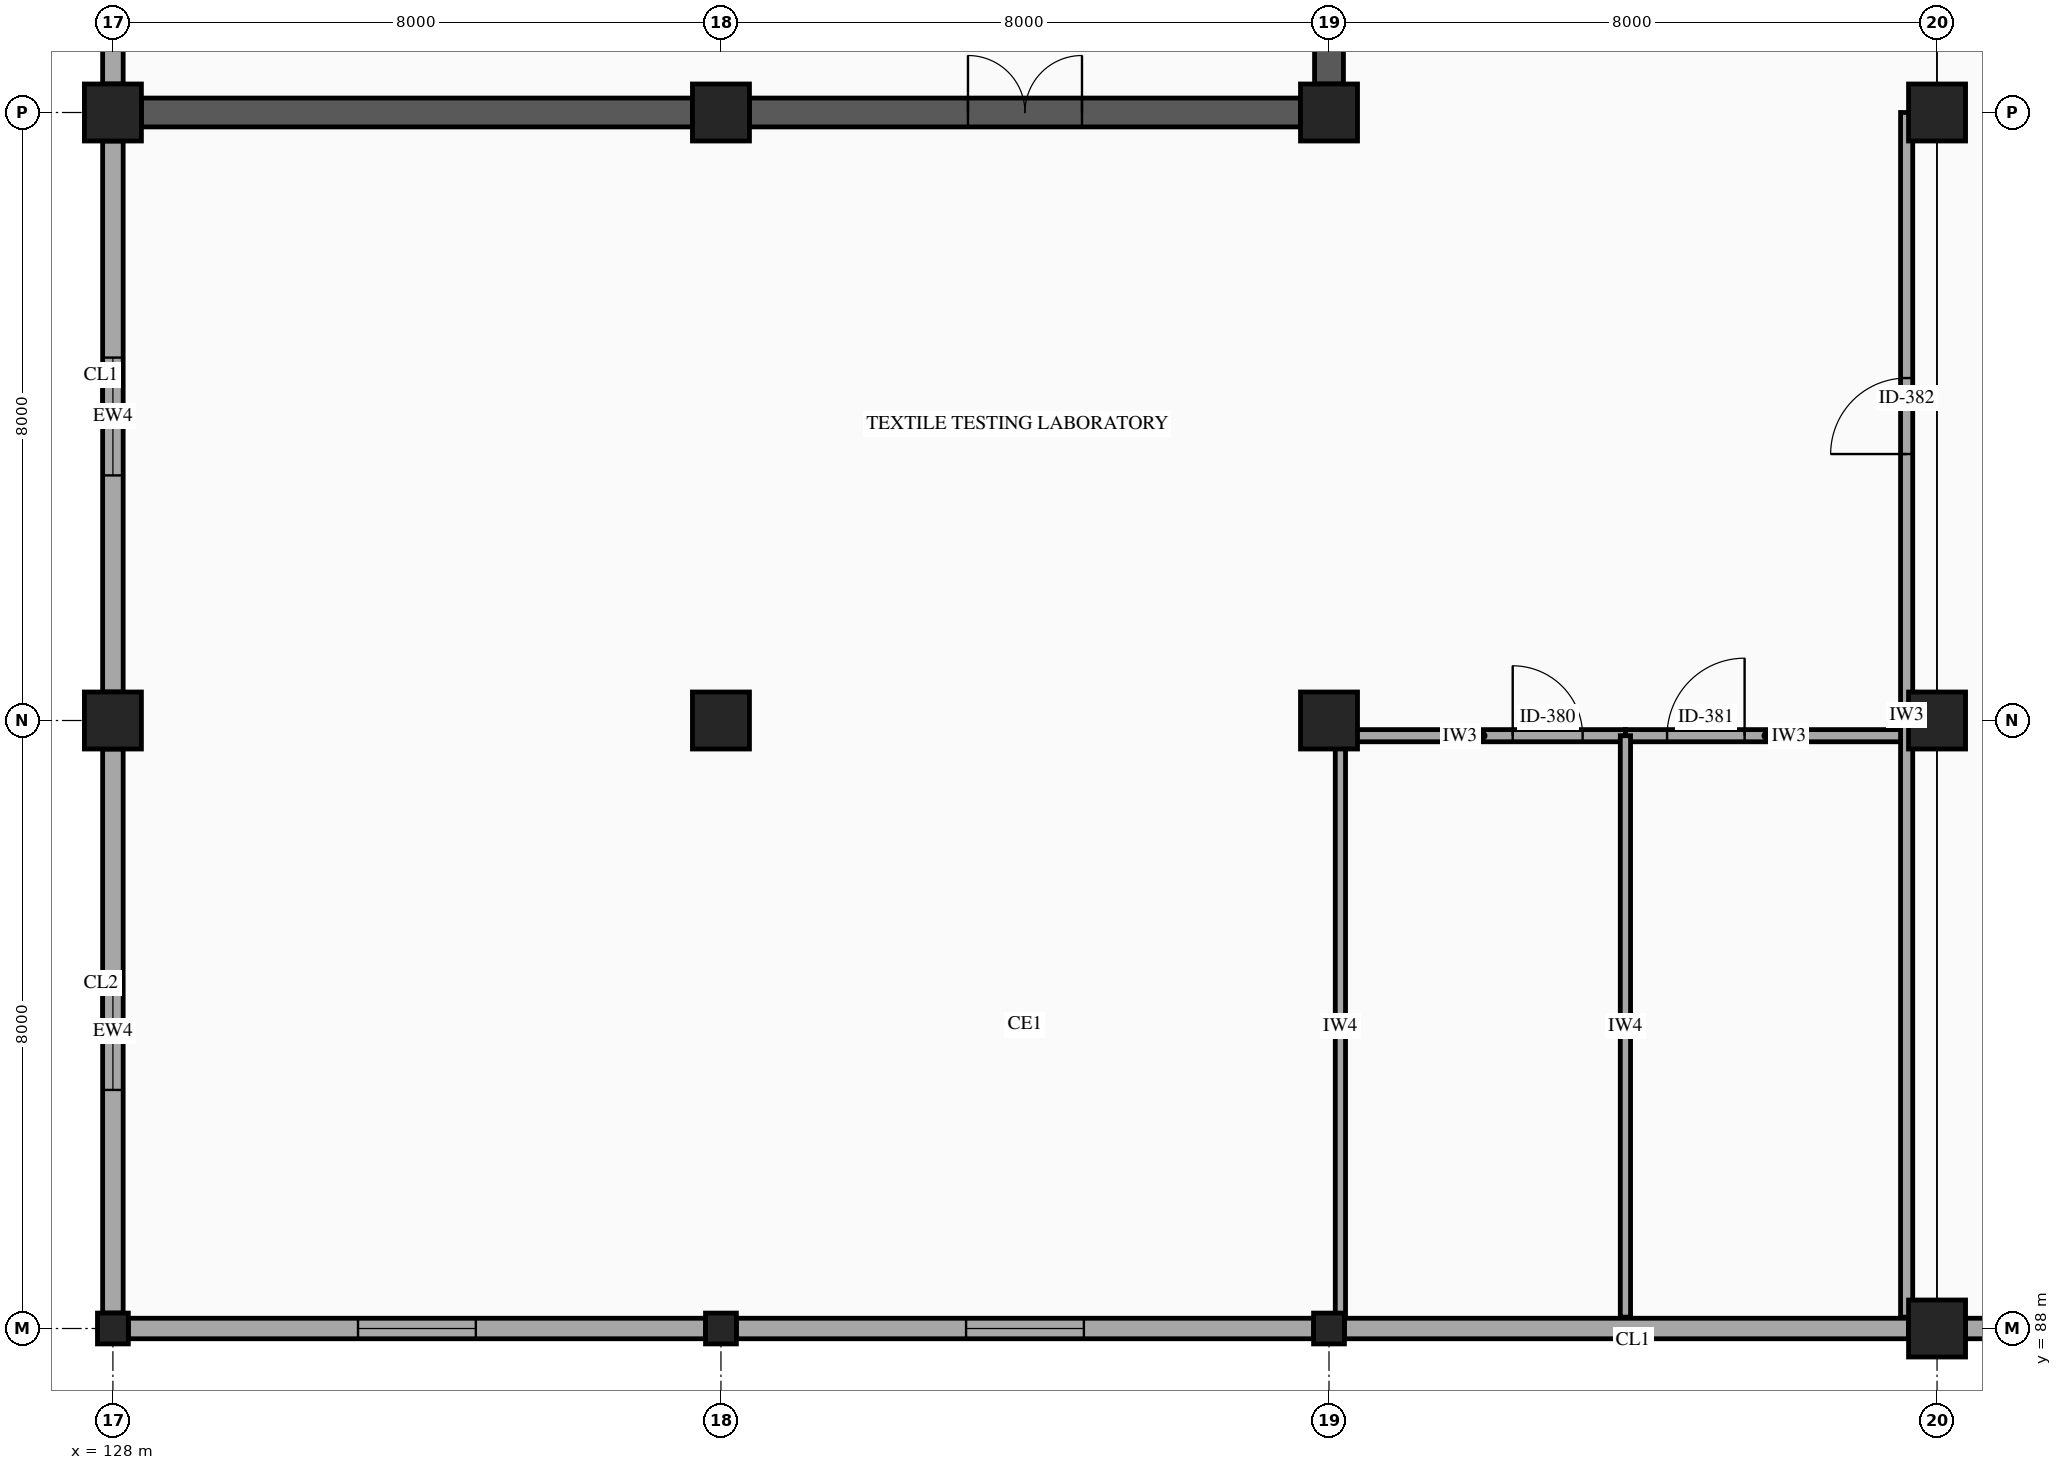
"""IFC4 building model, lengths in metres.
Left out: names, types, materials, properties, quantities, classifications, styles, units other than length and angle.
Written with IfcOpenShell. Run it as: python <this file> out.ifc"""

import sys

from ifc_helpers import new_model, si_unit, direction, frame, frame_2d, origin, origin_2d, place, context, subcontext, project, spatial, rectangle, hollow_circle, extrude, element, fill, save


model = new_model("IFC4")
c1 = context("Model", 3, precision=1e-05, world=origin(), true_north=direction((0.0, 1.0)))
c2 = subcontext(c1, "Body", "Model", "MODEL_VIEW")
j1 = project(units=[si_unit("LENGTHUNIT", "METRE"), si_unit("PLANEANGLEUNIT", "RADIAN")], contexts=[c1])
p1 = place(None, origin())
s1 = spatial("IfcSite", under=j1, at=p1, CompositionType="ELEMENT")
p2 = place(p1, origin())
s2 = spatial("IfcBuilding", under=s1, at=p2, CompositionType="ELEMENT")
p3 = place(p2, frame((0.0, 0.0, 32.9)))
s3 = spatial("IfcBuildingStorey", under=s2, at=p3, CompositionType="ELEMENT", Elevation=32.9)
p4 = place(p3, frame((128.0, 88.0, 0.0), z_axis=(0.0, 0.0, 1.0), x_axis=(1.0, 0.0, 0.0)))
e1 = element("IfcColumn", 1, at=p4, inside=s3, PredefinedType="COLUMN", context=c2, shape_type="SweptSolid", body=[
    extrude(hollow_circle(Radius=0.203, WallThickness=0.012, at=origin_2d()), origin(), (0.0, 0.0, 1.0), 4.6),
])
for number, where, z_axis, x_axis in (
    (2, (128.0, 96.0, 0.0), (0.0, 0.0, 1.0), (1.0, 0.0, 0.0)),
    (3, (128.0, 104.0, 0.0), (0.0, 0.0, 1.0), (1.0, 0.0, 0.0)),
):
    element("IfcColumn", number, at=place(p3, frame(where, z_axis=z_axis, x_axis=x_axis)), inside=s3, PredefinedType="COLUMN", context=c2, shape_type="SweptSolid", body=[
        extrude(rectangle(XDim=0.75, YDim=0.75, at=origin_2d()), origin(), (0.0, 0.0, 1.0), 4.6),
    ])
p5 = place(p3, frame((136.0, 88.0, 0.0), z_axis=(0.0, 0.0, 1.0), x_axis=(1.0, 0.0, 0.0)))
e4 = element("IfcColumn", 4, at=p5, inside=s3, PredefinedType="COLUMN", context=c2, shape_type="SweptSolid", body=[
    extrude(hollow_circle(Radius=0.203, WallThickness=0.012, at=origin_2d()), origin(), (0.0, 0.0, 1.0), 4.6),
])
for number, where, z_axis, x_axis in (
    (5, (136.0, 96.0, 0.0), (0.0, 0.0, 1.0), (1.0, 0.0, 0.0)),
    (6, (136.0, 104.0, 0.0), (0.0, 0.0, 1.0), (1.0, 0.0, 0.0)),
):
    element("IfcColumn", number, at=place(p3, frame(where, z_axis=z_axis, x_axis=x_axis)), inside=s3, PredefinedType="COLUMN", context=c2, shape_type="SweptSolid", body=[
        extrude(rectangle(XDim=0.75, YDim=0.75, at=origin_2d()), origin(), (0.0, 0.0, 1.0), 4.6),
    ])
p6 = place(p3, frame((144.0, 88.0, 0.0), z_axis=(0.0, 0.0, 1.0), x_axis=(1.0, 0.0, 0.0)))
e7 = element("IfcColumn", 7, at=p6, inside=s3, PredefinedType="COLUMN", context=c2, shape_type="SweptSolid", body=[
    extrude(hollow_circle(Radius=0.203, WallThickness=0.012, at=origin_2d()), origin(), (0.0, 0.0, 1.0), 4.6),
])
for number, where, z_axis, x_axis in (
    (8, (144.0, 96.0, 0.0), (0.0, 0.0, 1.0), (1.0, 0.0, 0.0)),
    (9, (144.0, 104.0, 0.0), (0.0, 0.0, 1.0), (1.0, 0.0, 0.0)),
    (10, (152.0, 88.0, 0.0), (0.0, 0.0, 1.0), (1.0, 0.0, 0.0)),
    (11, (152.0, 96.0, 0.0), (0.0, 0.0, 1.0), (1.0, 0.0, 0.0)),
    (12, (152.0, 104.0, 0.0), (0.0, 0.0, 1.0), (1.0, 0.0, 0.0)),
):
    element("IfcColumn", number, at=place(p3, frame(where, z_axis=z_axis, x_axis=x_axis)), inside=s3, PredefinedType="COLUMN", context=c2, shape_type="SweptSolid", body=[
        extrude(rectangle(XDim=0.75, YDim=0.75, at=origin_2d()), origin(), (0.0, 0.0, 1.0), 4.6),
    ])
p7 = place(p3, frame((128.0, 88.203, 0.0), z_axis=(0.0, 0.0, 1.0), x_axis=(0.0, 1.0, 0.0)))
e13 = element("IfcWall", 13, at=p7, inside=s3, PredefinedType="STANDARD", context=c2, shape_type="SweptSolid", body=[
    extrude(rectangle(XDim=7.422, YDim=0.27, at=frame_2d((3.711, 0.0))), origin(), (0.0, 0.0, 1.0), 3.58),
])
p8 = place(p7, frame((2.936, 0.0, 0.8)))
e14 = element("IfcOpeningElement", 14, at=p8, cuts=e13, PredefinedType="OPENING", context=c2, shape_type="SweptSolid", body=[
    extrude(rectangle(XDim=1.55, YDim=1.4, at=frame_2d((0.775, 0.7))), frame((0.0, 0.145, 0.0), z_axis=(0.0, -1.0, 0.0), x_axis=(1.0, 0.0, 0.0)), (0.0, 0.0, 1.0), 0.29),
])
p9 = place(p3, frame((128.0, 96.375, 0.0), z_axis=(0.0, 0.0, 1.0), x_axis=(0.0, 1.0, 0.0)))
e15 = element("IfcWall", 15, at=p9, inside=s3, PredefinedType="STANDARD", context=c2, shape_type="SweptSolid", body=[
    extrude(rectangle(XDim=7.25, YDim=0.27, at=frame_2d((3.625, 0.0))), origin(), (0.0, 0.0, 1.0), 3.58),
])
p10 = place(p9, frame((2.85, 0.0, 0.8)))
e16 = element("IfcOpeningElement", 16, at=p10, cuts=e15, PredefinedType="OPENING", context=c2, shape_type="SweptSolid", body=[
    extrude(rectangle(XDim=1.55, YDim=1.4, at=frame_2d((0.775, 0.7))), frame((0.0, 0.145, 0.0), z_axis=(0.0, -1.0, 0.0), x_axis=(1.0, 0.0, 0.0)), (0.0, 0.0, 1.0), 0.29),
])
p11 = place(p3, frame((128.0, 104.375, 0.0), z_axis=(0.0, 0.0, 1.0), x_axis=(0.0, 1.0, 0.0)))
e17 = element("IfcWall", 17, at=p11, inside=s3, PredefinedType="STANDARD", context=c2, shape_type="SweptSolid", body=[
    extrude(rectangle(XDim=7.25, YDim=0.27, at=frame_2d((3.625, 0.0))), origin(), (0.0, 0.0, 1.0), 3.58),
])
p12 = place(p3, frame((159.625, 88.0, 0.0), z_axis=(0.0, 0.0, 1.0), x_axis=(-1.0, 0.0, 0.0)))
e18 = element("IfcWall", 18, at=p12, inside=s3, PredefinedType="STANDARD", context=c2, shape_type="SweptSolid", body=[
    extrude(rectangle(XDim=7.25, YDim=0.27, at=frame_2d((3.625, 0.0))), origin(), (0.0, 0.0, 1.0), 3.58),
])
p13 = place(p12, frame((2.85, 0.0, 0.8)))
e19 = element("IfcOpeningElement", 19, at=p13, cuts=e18, PredefinedType="OPENING", context=c2, shape_type="SweptSolid", body=[
    extrude(rectangle(XDim=1.55, YDim=1.4, at=frame_2d((0.775, 0.7))), frame((0.0, 0.145, 0.0), z_axis=(0.0, -1.0, 0.0), x_axis=(1.0, 0.0, 0.0)), (0.0, 0.0, 1.0), 0.29),
])
p14 = place(p3, frame((151.625, 88.0, 0.0), z_axis=(0.0, 0.0, 1.0), x_axis=(-1.0, 0.0, 0.0)))
e20 = element("IfcWall", 20, at=p14, inside=s3, PredefinedType="STANDARD", context=c2, shape_type="SweptSolid", body=[
    extrude(rectangle(XDim=7.422, YDim=0.27, at=frame_2d((3.711, 0.0))), origin(), (0.0, 0.0, 1.0), 3.58),
])
p15 = place(p3, frame((143.797, 88.0, 0.0), z_axis=(0.0, 0.0, 1.0), x_axis=(-1.0, 0.0, 0.0)))
e21 = element("IfcWall", 21, at=p15, inside=s3, PredefinedType="STANDARD", context=c2, shape_type="SweptSolid", body=[
    extrude(rectangle(XDim=7.594, YDim=0.27, at=frame_2d((3.797, 0.0))), origin(), (0.0, 0.0, 1.0), 3.58),
])
p16 = place(p15, frame((3.022, 0.0, 0.8)))
e22 = element("IfcOpeningElement", 22, at=p16, cuts=e21, PredefinedType="OPENING", context=c2, shape_type="SweptSolid", body=[
    extrude(rectangle(XDim=1.55, YDim=1.4, at=frame_2d((0.775, 0.7))), frame((0.0, 0.145, 0.0), z_axis=(0.0, -1.0, 0.0), x_axis=(1.0, 0.0, 0.0)), (0.0, 0.0, 1.0), 0.29),
])
p17 = place(p3, frame((135.797, 88.0, 0.0), z_axis=(0.0, 0.0, 1.0), x_axis=(-1.0, 0.0, 0.0)))
e23 = element("IfcWall", 23, at=p17, inside=s3, PredefinedType="STANDARD", context=c2, shape_type="SweptSolid", body=[
    extrude(rectangle(XDim=7.594, YDim=0.27, at=frame_2d((3.797, 0.0))), origin(), (0.0, 0.0, 1.0), 3.58),
])
p18 = place(p17, frame((3.022, 0.0, 0.8)))
e24 = element("IfcOpeningElement", 24, at=p18, cuts=e23, PredefinedType="OPENING", context=c2, shape_type="SweptSolid", body=[
    extrude(rectangle(XDim=1.55, YDim=1.4, at=frame_2d((0.775, 0.7))), frame((0.0, 0.145, 0.0), z_axis=(0.0, -1.0, 0.0), x_axis=(1.0, 0.0, 0.0)), (0.0, 0.0, 1.0), 0.29),
])
p19 = place(p3, frame((128.375, 104.0, 0.0), z_axis=(0.0, 0.0, 1.0), x_axis=(1.0, 0.0, 0.0)))
e25 = element("IfcWall", 25, at=p19, inside=s3, PredefinedType="SHEAR", context=c2, shape_type="SweptSolid", body=[
    extrude(rectangle(XDim=7.25, YDim=0.38, at=frame_2d((3.625, 0.0))), origin(), (0.0, 0.0, 1.0), 4.38),
])
p20 = place(p3, frame((136.375, 104.0, 0.0), z_axis=(0.0, 0.0, 1.0), x_axis=(1.0, 0.0, 0.0)))
e26 = element("IfcWall", 26, at=p20, inside=s3, PredefinedType="SHEAR", context=c2, shape_type="SweptSolid", body=[
    extrude(rectangle(XDim=7.25, YDim=0.38, at=frame_2d((3.625, 0.0))), origin(), (0.0, 0.0, 1.0), 4.38),
])
p21 = place(p20, frame((2.875, 0.0, 0.0)))
e27 = element("IfcOpeningElement", 27, at=p21, cuts=e26, PredefinedType="OPENING", context=c2, shape_type="SweptSolid", body=[
    extrude(rectangle(XDim=1.5, YDim=2.15, at=frame_2d((0.75, 1.075))), frame((0.0, 0.2, 0.0), z_axis=(0.0, -1.0, 0.0), x_axis=(1.0, 0.0, 0.0)), (0.0, 0.0, 1.0), 0.4),
])
p22 = place(p3, frame((144.0, 104.375, 0.0), z_axis=(0.0, 0.0, 1.0), x_axis=(0.0, 1.0, 0.0)))
e28 = element("IfcWall", 28, at=p22, inside=s3, PredefinedType="SHEAR", context=c2, shape_type="SweptSolid", body=[
    extrude(rectangle(XDim=7.25, YDim=0.38, at=frame_2d((3.625, 0.0))), origin(), (0.0, 0.0, 1.0), 4.38),
])
p23 = place(p22, frame((1.838, 0.0, 0.0)))
e29 = element("IfcOpeningElement", 29, at=p23, cuts=e28, PredefinedType="OPENING", context=c2, shape_type="SweptSolid", body=[
    extrude(rectangle(XDim=1.5, YDim=2.15, at=frame_2d((0.75, 1.075))), frame((0.0, 0.2, 0.0), z_axis=(0.0, -1.0, 0.0), x_axis=(1.0, 0.0, 0.0)), (0.0, 0.0, 1.0), 0.4),
])
p24 = place(p3, frame((144.15, 95.8, 0.0), z_axis=(0.0, 0.0, 1.0), x_axis=(1.0, 0.0, 0.0)))
e30 = element("IfcWall", 30, at=p24, inside=s3, PredefinedType="PARTITIONING", context=c2, shape_type="SweptSolid", body=[
    extrude(rectangle(XDim=3.75, YDim=0.16, at=frame_2d((1.875, 0.0))), origin(), (0.0, 0.0, 1.0), 3.58),
])
p25 = place(p24, frame((2.267, 0.0, 0.0)))
e31 = element("IfcOpeningElement", 31, at=p25, cuts=e30, PredefinedType="OPENING", context=c2, shape_type="SweptSolid", body=[
    extrude(rectangle(XDim=0.92, YDim=2.1, at=frame_2d((0.46, 1.05))), frame((0.0, 0.09, 0.0), z_axis=(0.0, -1.0, 0.0), x_axis=(1.0, 0.0, 0.0)), (0.0, 0.0, 1.0), 0.18),
])
p26 = place(p3, frame((147.9, 95.8, 0.0), z_axis=(0.0, 0.0, 1.0), x_axis=(1.0, 0.0, 0.0)))
e32 = element("IfcWall", 32, at=p26, inside=s3, PredefinedType="PARTITIONING", context=c2, shape_type="SweptSolid", body=[
    extrude(rectangle(XDim=3.7, YDim=0.16, at=frame_2d((1.85, 0.0))), origin(), (0.0, 0.0, 1.0), 3.58),
])
p27 = place(p26, frame((0.548, 0.0, 0.0)))
e33 = element("IfcOpeningElement", 33, at=p27, cuts=e32, PredefinedType="OPENING", context=c2, shape_type="SweptSolid", body=[
    extrude(rectangle(XDim=1.02, YDim=2.1, at=frame_2d((0.51, 1.05))), frame((0.0, 0.09, 0.0), z_axis=(0.0, -1.0, 0.0), x_axis=(1.0, 0.0, 0.0)), (0.0, 0.0, 1.0), 0.18),
])
for number, where, z_axis, x_axis in (
    (34, (144.15, 88.15, 0.0), (0.0, 0.0, 1.0), (0.0, 1.0, 0.0)),
    (35, (147.9, 88.15, 0.0), (0.0, 0.0, 1.0), (0.0, 1.0, 0.0)),
):
    element("IfcWall", number, at=place(p3, frame(where, z_axis=z_axis, x_axis=x_axis)), inside=s3, PredefinedType="PARTITIONING", context=c2, shape_type="SweptSolid", body=[
        extrude(rectangle(XDim=7.65, YDim=0.135, at=frame_2d((3.825, 0.0))), origin(), (0.0, 0.0, 1.0), 3.58),
    ])
p28 = place(p3, frame((151.6, 88.15, 0.0), z_axis=(0.0, 0.0, 1.0), x_axis=(0.0, 1.0, 0.0)))
e36 = element("IfcWall", 36, at=p28, inside=s3, PredefinedType="PARTITIONING", context=c2, shape_type="SweptSolid", body=[
    extrude(rectangle(XDim=15.85, YDim=0.16, at=frame_2d((7.925, 0.0))), origin(), (0.0, 0.0, 1.0), 3.58),
])
p29 = place(p28, frame((11.356, 0.0, 0.0)))
e37 = element("IfcOpeningElement", 37, at=p29, cuts=e36, PredefinedType="OPENING", context=c2, shape_type="SweptSolid", body=[
    extrude(rectangle(XDim=1.0, YDim=2.15, at=frame_2d((0.5, 1.075))), frame((0.0, 0.09, 0.0), z_axis=(0.0, -1.0, 0.0), x_axis=(1.0, 0.0, 0.0)), (0.0, 0.0, 1.0), 0.18),
])
p30 = place(p8, origin())
e38 = element("IfcWindow", 38, at=p30, inside=s3, PartitioningType="SINGLE_PANEL", PredefinedType="WINDOW", context=c2, shape_type="SweptSolid", body=[
    extrude(rectangle(XDim=1.55, YDim=1.4, at=frame_2d((0.775, 0.7))), frame((0.0, 0.03, 0.0), z_axis=(0.0, -1.0, 0.0), x_axis=(1.0, 0.0, 0.0)), (0.0, 0.0, 1.0), 0.06),
])
fill(e14, e38)
p31 = place(p10, origin())
e39 = element("IfcWindow", 39, at=p31, inside=s3, PartitioningType="SINGLE_PANEL", PredefinedType="WINDOW", context=c2, shape_type="SweptSolid", body=[
    extrude(rectangle(XDim=1.55, YDim=1.4, at=frame_2d((0.775, 0.7))), frame((0.0, 0.03, 0.0), z_axis=(0.0, -1.0, 0.0), x_axis=(1.0, 0.0, 0.0)), (0.0, 0.0, 1.0), 0.06),
])
fill(e16, e39)
p32 = place(p16, origin())
e40 = element("IfcWindow", 40, at=p32, inside=s3, PartitioningType="SINGLE_PANEL", PredefinedType="WINDOW", context=c2, shape_type="SweptSolid", body=[
    extrude(rectangle(XDim=1.55, YDim=1.4, at=frame_2d((0.775, 0.7))), frame((0.0, 0.03, 0.0), z_axis=(0.0, -1.0, 0.0), x_axis=(1.0, 0.0, 0.0)), (0.0, 0.0, 1.0), 0.06),
])
fill(e22, e40)
p33 = place(p18, origin())
e41 = element("IfcWindow", 41, at=p33, inside=s3, PartitioningType="SINGLE_PANEL", PredefinedType="WINDOW", context=c2, shape_type="SweptSolid", body=[
    extrude(rectangle(XDim=1.55, YDim=1.4, at=frame_2d((0.775, 0.7))), frame((0.0, 0.03, 0.0), z_axis=(0.0, -1.0, 0.0), x_axis=(1.0, 0.0, 0.0)), (0.0, 0.0, 1.0), 0.06),
])
fill(e24, e41)
p34 = place(p21, origin())
e42 = element("IfcDoor", 42, at=p34, inside=s3, OperationType="DOUBLE_DOOR_SINGLE_SWING", PredefinedType="DOOR", context=c2, shape_type="SweptSolid", body=[
    extrude(rectangle(XDim=1.5, YDim=2.15, at=frame_2d((0.75, 1.075))), frame((0.0, 0.025, 0.0), z_axis=(0.0, -1.0, 0.0), x_axis=(1.0, 0.0, 0.0)), (0.0, 0.0, 1.0), 0.05),
])
fill(e27, e42)
p35 = place(p25, origin())
e43 = element("IfcDoor", 43, at=p35, inside=s3, OperationType="SINGLE_SWING_LEFT", PredefinedType="DOOR", context=c2, shape_type="SweptSolid", body=[
    extrude(rectangle(XDim=0.92, YDim=2.1, at=frame_2d((0.46, 1.05))), frame((0.0, 0.025, 0.0), z_axis=(0.0, -1.0, 0.0), x_axis=(1.0, 0.0, 0.0)), (0.0, 0.0, 1.0), 0.05),
])
fill(e31, e43)
p36 = place(p27, origin())
e44 = element("IfcDoor", 44, at=p36, inside=s3, OperationType="SINGLE_SWING_RIGHT", PredefinedType="DOOR", context=c2, shape_type="SweptSolid", body=[
    extrude(rectangle(XDim=1.02, YDim=2.1, at=frame_2d((0.51, 1.05))), frame((0.0, 0.025, 0.0), z_axis=(0.0, -1.0, 0.0), x_axis=(1.0, 0.0, 0.0)), (0.0, 0.0, 1.0), 0.05),
])
fill(e33, e44)
p37 = place(p29, origin())
e45 = element("IfcDoor", 45, at=p37, inside=s3, OperationType="SINGLE_SWING_LEFT", PredefinedType="DOOR", context=c2, shape_type="SweptSolid", body=[
    extrude(rectangle(XDim=1.0, YDim=2.15, at=frame_2d((0.5, 1.075))), frame((0.0, 0.025, 0.0), z_axis=(0.0, -1.0, 0.0), x_axis=(1.0, 0.0, 0.0)), (0.0, 0.0, 1.0), 0.05),
])
fill(e37, e45)
save(model, sys.argv[1])
